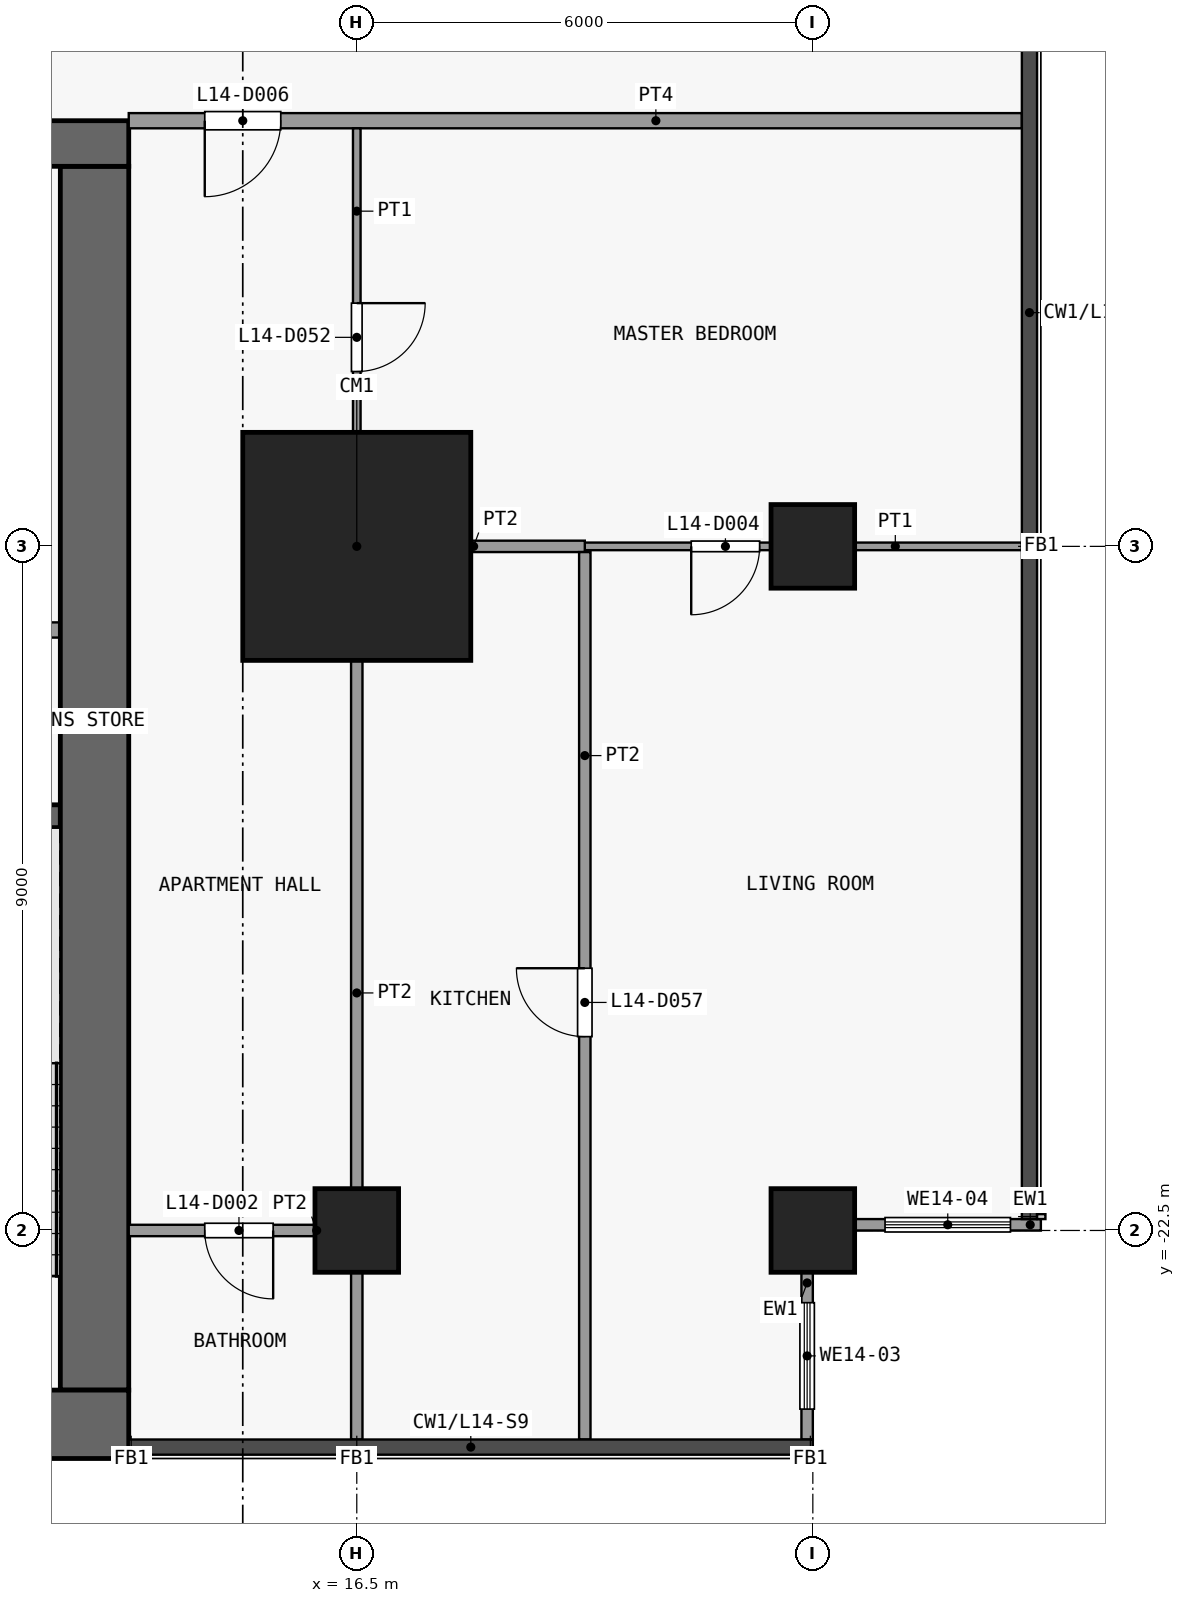
"""IFC4 building model, lengths in metres.
Left out: names, types, materials, properties, quantities, classifications, styles, units other than length and angle.
Written with IfcOpenShell. Run it as: python <this file> out.ifc"""

import sys

from ifc_helpers import new_model, si_unit, direction, frame, frame_2d, origin, origin_2d, place, context, subcontext, project, spatial, rectangle, extrude, element, fill, save


model = new_model("IFC4")
c1 = context("Model", 3, precision=1e-05, world=origin(), true_north=direction((0.0, 1.0)))
c2 = subcontext(c1, "Body", "Model", "MODEL_VIEW")
j1 = project(units=[si_unit("LENGTHUNIT", "METRE"), si_unit("PLANEANGLEUNIT", "RADIAN")], contexts=[c1])
p1 = place(None, origin())
s1 = spatial("IfcSite", under=j1, at=p1, CompositionType="ELEMENT")
p2 = place(p1, origin())
s2 = spatial("IfcBuilding", under=s1, at=p2, CompositionType="ELEMENT")
p3 = place(p2, frame((0.0, 0.0, 61.3)))
s3 = spatial("IfcBuildingStorey", under=s2, at=p3, CompositionType="ELEMENT", Elevation=61.3)
p4 = place(p3, frame((16.5, -22.5, 0.0), z_axis=(0.0, 0.0, 1.0), x_axis=(1.0, 0.0, 0.0)))
e1 = element("IfcColumn", 1, at=p4, inside=s3, PredefinedType="COLUMN", context=c2, shape_type="SweptSolid", body=[
    extrude(rectangle(XDim=1.1, YDim=1.1, at=origin_2d()), origin(), (0.0, 0.0, 1.0), 3.6),
])
p5 = place(p3, frame((16.5, -13.5, 0.0), z_axis=(0.0, 0.0, 1.0), x_axis=(1.0, 0.0, 0.0)))
e2 = element("IfcColumn", 2, at=p5, inside=s3, PredefinedType="COLUMN", context=c2, shape_type="SweptSolid", body=[
    extrude(rectangle(XDim=3.0, YDim=3.0, at=origin_2d()), origin(), (0.0, 0.0, 1.0), 3.6),
])
for number, where, z_axis, x_axis in (
    (3, (22.5, -22.5, 0.0), (0.0, 0.0, 1.0), (1.0, 0.0, 0.0)),
    (4, (22.5, -13.5, 0.0), (0.0, 0.0, 1.0), (1.0, 0.0, 0.0)),
):
    element("IfcColumn", number, at=place(p3, frame(where, z_axis=z_axis, x_axis=x_axis)), inside=s3, PredefinedType="COLUMN", context=c2, shape_type="SweptSolid", body=[
        extrude(rectangle(XDim=1.1, YDim=1.1, at=origin_2d()), origin(), (0.0, 0.0, 1.0), 3.6),
    ])
p6 = place(p3, frame((-13.5, -25.05, 0.0), z_axis=(0.0, 0.0, 1.0), x_axis=(1.0, 0.0, 0.0)))
e5 = element("IfcWall", 5, at=p6, inside=s3, PredefinedType="SHEAR", context=c2, shape_type="SweptSolid", body=[
    extrude(rectangle(XDim=27.0, YDim=0.9, at=frame_2d((13.5, 0.0))), origin(), (0.0, 0.0, 1.0), 3.3),
])
p7 = place(p3, frame((-13.5, -8.2, 0.0), z_axis=(0.0, 0.0, 1.0), x_axis=(1.0, 0.0, 0.0)))
e6 = element("IfcWall", 6, at=p7, inside=s3, PredefinedType="SHEAR", context=c2, shape_type="SweptSolid", body=[
    extrude(rectangle(XDim=27.0, YDim=0.6, at=frame_2d((13.5, 0.0))), origin(), (0.0, 0.0, 1.0), 3.3),
])
p8 = place(p7, frame((7.8, 0.0, 0.0)))
e7 = element("IfcOpeningElement", 7, at=p8, cuts=e6, PredefinedType="OPENING", context=c2, shape_type="SweptSolid", body=[
    extrude(rectangle(XDim=1.8, YDim=2.1, at=frame_2d((0.9, 1.05))), frame((0.0, 0.31, 0.0), z_axis=(0.0, -1.0, 0.0), x_axis=(1.0, 0.0, 0.0)), (0.0, 0.0, 1.0), 0.62),
])
p9 = place(p7, frame((17.4, 0.0, 0.0)))
e8 = element("IfcOpeningElement", 8, at=p9, cuts=e6, PredefinedType="OPENING", context=c2, shape_type="SweptSolid", body=[
    extrude(rectangle(XDim=1.8, YDim=2.1, at=frame_2d((0.9, 1.05))), frame((0.0, 0.31, 0.0), z_axis=(0.0, -1.0, 0.0), x_axis=(1.0, 0.0, 0.0)), (0.0, 0.0, 1.0), 0.62),
])
p10 = place(p7, frame((1.725, 0.0, 0.0)))
e9 = element("IfcOpeningElement", 9, at=p10, cuts=e6, PredefinedType="OPENING", context=c2, shape_type="SweptSolid", body=[
    extrude(rectangle(XDim=1.2, YDim=2.1, at=frame_2d((0.6, 1.05))), frame((0.0, 0.31, 0.0), z_axis=(0.0, -1.0, 0.0), x_axis=(1.0, 0.0, 0.0)), (0.0, 0.0, 1.0), 0.62),
])
p11 = place(p7, frame((23.375, 0.0, 0.0)))
e10 = element("IfcOpeningElement", 10, at=p11, cuts=e6, PredefinedType="OPENING", context=c2, shape_type="SweptSolid", body=[
    extrude(rectangle(XDim=0.9, YDim=2.1, at=frame_2d((0.45, 1.05))), frame((0.0, 0.31, 0.0), z_axis=(0.0, -1.0, 0.0), x_axis=(1.0, 0.0, 0.0)), (0.0, 0.0, 1.0), 0.62),
])
p12 = place(p3, frame((13.05, -24.6, 0.0), z_axis=(0.0, 0.0, 1.0), x_axis=(0.0, 1.0, 0.0)))
e11 = element("IfcWall", 11, at=p12, inside=s3, PredefinedType="SHEAR", context=c2, shape_type="SweptSolid", body=[
    extrude(rectangle(XDim=16.1, YDim=0.9, at=frame_2d((8.05, 0.0))), origin(), (0.0, 0.0, 1.0), 3.3),
])
p13 = place(p3, frame((9.5, -17.05, 0.0), z_axis=(0.0, 0.0, 1.0), x_axis=(1.0, 0.0, 0.0)))
e12 = element("IfcWall", 12, at=p13, inside=s3, PredefinedType="SHEAR", context=c2, shape_type="SweptSolid", body=[
    extrude(rectangle(XDim=3.1, YDim=0.3, at=frame_2d((1.55, 0.0))), origin(), (0.0, 0.0, 1.0), 3.3),
])
p14 = place(p3, frame((11.15, -14.6, 0.0), z_axis=(0.0, 0.0, 1.0), x_axis=(1.0, 0.0, 0.0)))
e13 = element("IfcWall", 13, at=p14, inside=s3, PredefinedType="PARTITIONING", context=c2, shape_type="SweptSolid", body=[
    extrude(rectangle(XDim=1.45, YDim=0.2, at=frame_2d((0.725, 0.0))), origin(), (0.0, 0.0, 1.0), 3.3),
])
p15 = place(p3, frame((22.425, -23.05, 0.0), z_axis=(0.0, 0.0, 1.0), x_axis=(0.0, -1.0, 0.0)))
e14 = element("IfcWall", 14, at=p15, inside=s3, PredefinedType="SOLIDWALL", context=c2, shape_type="SweptSolid", body=[
    extrude(rectangle(XDim=2.2, YDim=0.15, at=frame_2d((1.1, 0.0))), origin(), (0.0, 0.0, 1.0), 3.3),
])
p16 = place(p15, frame((0.4, 0.0, 0.9)))
e15 = element("IfcOpeningElement", 15, at=p16, cuts=e14, PredefinedType="OPENING", context=c2, shape_type="SweptSolid", body=[
    extrude(rectangle(XDim=1.4, YDim=2.4, at=frame_2d((0.7, 1.2))), frame((0.0, 0.085, 0.0), z_axis=(0.0, -1.0, 0.0), x_axis=(1.0, 0.0, 0.0)), (0.0, 0.0, 1.0), 0.17),
])
p17 = place(p3, frame((25.5, -22.425, 0.0), z_axis=(0.0, 0.0, 1.0), x_axis=(-1.0, 0.0, 0.0)))
e16 = element("IfcWall", 16, at=p17, inside=s3, PredefinedType="SOLIDWALL", context=c2, shape_type="SweptSolid", body=[
    extrude(rectangle(XDim=2.45, YDim=0.15, at=frame_2d((1.225, 0.0))), origin(), (0.0, 0.0, 1.0), 3.3),
])
p18 = place(p17, frame((0.4, 0.0, 0.9)))
e17 = element("IfcOpeningElement", 17, at=p18, cuts=e16, PredefinedType="OPENING", context=c2, shape_type="SweptSolid", body=[
    extrude(rectangle(XDim=1.65, YDim=2.4, at=frame_2d((0.825, 1.2))), frame((0.0, 0.085, 0.0), z_axis=(0.0, -1.0, 0.0), x_axis=(1.0, 0.0, 0.0)), (0.0, 0.0, 1.0), 0.17),
])
p19 = place(p3, frame((13.5, -22.5, 0.0), z_axis=(0.0, 0.0, 1.0), x_axis=(1.0, 0.0, 0.0)))
e18 = element("IfcWall", 18, at=p19, inside=s3, PredefinedType="PARTITIONING", context=c2, shape_type="SweptSolid", body=[
    extrude(rectangle(XDim=2.925, YDim=0.15, at=frame_2d((1.462, 0.0))), origin(), (0.0, 0.0, 1.0), 3.3),
])
p20 = place(p19, frame((1.0, 0.0, 0.0)))
e19 = element("IfcOpeningElement", 19, at=p20, cuts=e18, PredefinedType="OPENING", context=c2, shape_type="SweptSolid", body=[
    extrude(rectangle(XDim=0.9, YDim=2.1, at=frame_2d((0.45, 1.05))), frame((0.0, 0.085, 0.0), z_axis=(0.0, -1.0, 0.0), x_axis=(1.0, 0.0, 0.0)), (0.0, 0.0, 1.0), 0.17),
])
p21 = place(p3, frame((19.5, -13.5, 0.0), z_axis=(0.0, 0.0, 1.0), x_axis=(1.0, 0.0, 0.0)))
e20 = element("IfcWall", 20, at=p21, inside=s3, PredefinedType="PARTITIONING", context=c2, shape_type="SweptSolid", body=[
    extrude(rectangle(XDim=5.75, YDim=0.1, at=frame_2d((2.875, 0.0))), origin(), (0.0, 0.0, 1.0), 3.3),
])
p22 = place(p21, frame((1.4, 0.0, 0.0)))
e21 = element("IfcOpeningElement", 21, at=p22, cuts=e20, PredefinedType="OPENING", context=c2, shape_type="SweptSolid", body=[
    extrude(rectangle(XDim=0.9, YDim=2.1, at=frame_2d((0.45, 1.05))), frame((0.0, 0.06, 0.0), z_axis=(0.0, -1.0, 0.0), x_axis=(1.0, 0.0, 0.0)), (0.0, 0.0, 1.0), 0.12),
])
p23 = place(p3, frame((16.575, -13.5, 0.0), z_axis=(0.0, 0.0, 1.0), x_axis=(1.0, 0.0, 0.0)))
e22 = element("IfcWall", 22, at=p23, inside=s3, PredefinedType="PARTITIONING", context=c2, shape_type="SweptSolid", body=[
    extrude(rectangle(XDim=2.925, YDim=0.15, at=frame_2d((1.462, 0.0))), origin(), (0.0, 0.0, 1.0), 3.3),
])
p24 = place(p3, frame((13.5, -7.9, 0.0), z_axis=(0.0, 0.0, 1.0), x_axis=(1.0, 0.0, 0.0)))
e23 = element("IfcWall", 23, at=p24, inside=s3, PredefinedType="PARTITIONING", context=c2, shape_type="SweptSolid", body=[
    extrude(rectangle(XDim=11.75, YDim=0.2, at=frame_2d((5.875, 0.0))), origin(), (0.0, 0.0, 1.0), 3.3),
])
p25 = place(p24, frame((1.0, 0.0, 0.0)))
e24 = element("IfcOpeningElement", 24, at=p25, cuts=e23, PredefinedType="OPENING", context=c2, shape_type="SweptSolid", body=[
    extrude(rectangle(XDim=1.0, YDim=2.1, at=frame_2d((0.5, 1.05))), frame((0.0, 0.11, 0.0), z_axis=(0.0, -1.0, 0.0), x_axis=(1.0, 0.0, 0.0)), (0.0, 0.0, 1.0), 0.22),
])
p26 = place(p3, frame((16.5, -13.5, 0.0), z_axis=(0.0, 0.0, 1.0), x_axis=(0.0, 1.0, 0.0)))
e25 = element("IfcWall", 25, at=p26, inside=s3, PredefinedType="PARTITIONING", context=c2, shape_type="SweptSolid", body=[
    extrude(rectangle(XDim=5.5, YDim=0.1, at=frame_2d((2.75, 0.0))), origin(), (0.0, 0.0, 1.0), 3.3),
])
p27 = place(p26, frame((2.3, 0.0, 0.0)))
e26 = element("IfcOpeningElement", 26, at=p27, cuts=e25, PredefinedType="OPENING", context=c2, shape_type="SweptSolid", body=[
    extrude(rectangle(XDim=0.9, YDim=2.1, at=frame_2d((0.45, 1.05))), frame((0.0, 0.06, 0.0), z_axis=(0.0, -1.0, 0.0), x_axis=(1.0, 0.0, 0.0)), (0.0, 0.0, 1.0), 0.12),
])
p28 = place(p3, frame((16.5, -25.25, 0.0), z_axis=(0.0, 0.0, 1.0), x_axis=(0.0, 1.0, 0.0)))
e27 = element("IfcWall", 27, at=p28, inside=s3, PredefinedType="PARTITIONING", context=c2, shape_type="SweptSolid", body=[
    extrude(rectangle(XDim=11.75, YDim=0.15, at=frame_2d((5.875, 0.0))), origin(), (0.0, 0.0, 1.0), 3.3),
])
p29 = place(p3, frame((19.5, -25.25, 0.0), z_axis=(0.0, 0.0, 1.0), x_axis=(0.0, 1.0, 0.0)))
e28 = element("IfcWall", 28, at=p29, inside=s3, PredefinedType="PARTITIONING", context=c2, shape_type="SweptSolid", body=[
    extrude(rectangle(XDim=11.675, YDim=0.15, at=frame_2d((5.837, 0.0))), origin(), (0.0, 0.0, 1.0), 3.3),
])
p30 = place(p29, frame((5.3, 0.0, 0.0)))
e29 = element("IfcOpeningElement", 29, at=p30, cuts=e28, PredefinedType="OPENING", context=c2, shape_type="SweptSolid", body=[
    extrude(rectangle(XDim=0.9, YDim=2.1, at=frame_2d((0.45, 1.05))), frame((0.0, 0.085, 0.0), z_axis=(0.0, -1.0, 0.0), x_axis=(1.0, 0.0, 0.0)), (0.0, 0.0, 1.0), 0.17),
])
p31 = place(p16, origin())
e30 = element("IfcWindow", 30, at=p31, inside=s3, PartitioningType="SINGLE_PANEL", PredefinedType="WINDOW", context=c2, shape_type="SweptSolid", body=[
    extrude(rectangle(XDim=1.4, YDim=2.4, at=frame_2d((0.7, 1.2))), frame((0.0, 0.03, 0.0), z_axis=(0.0, -1.0, 0.0), x_axis=(1.0, 0.0, 0.0)), (0.0, 0.0, 1.0), 0.06),
])
fill(e15, e30)
p32 = place(p18, origin())
e31 = element("IfcWindow", 31, at=p32, inside=s3, PartitioningType="SINGLE_PANEL", PredefinedType="WINDOW", context=c2, shape_type="SweptSolid", body=[
    extrude(rectangle(XDim=1.65, YDim=2.4, at=frame_2d((0.825, 1.2))), frame((0.0, 0.03, 0.0), z_axis=(0.0, -1.0, 0.0), x_axis=(1.0, 0.0, 0.0)), (0.0, 0.0, 1.0), 0.06),
])
fill(e17, e31)
p33 = place(p20, origin())
e32 = element("IfcDoor", 32, at=p33, inside=s3, OperationType="SINGLE_SWING_RIGHT", PredefinedType="DOOR", context=c2, shape_type="SweptSolid", body=[
    extrude(rectangle(XDim=0.9, YDim=2.1, at=frame_2d((0.45, 1.05))), frame((0.0, 0.025, 0.0), z_axis=(0.0, -1.0, 0.0), x_axis=(1.0, 0.0, 0.0)), (0.0, 0.0, 1.0), 0.05),
])
fill(e19, e32)
p34 = place(p22, origin())
e33 = element("IfcDoor", 33, at=p34, inside=s3, OperationType="SINGLE_SWING_LEFT", PredefinedType="DOOR", context=c2, shape_type="SweptSolid", body=[
    extrude(rectangle(XDim=0.9, YDim=2.1, at=frame_2d((0.45, 1.05))), frame((0.0, 0.025, 0.0), z_axis=(0.0, -1.0, 0.0), x_axis=(1.0, 0.0, 0.0)), (0.0, 0.0, 1.0), 0.05),
])
fill(e21, e33)
p35 = place(p25, origin())
e34 = element("IfcDoor", 34, at=p35, inside=s3, OperationType="SINGLE_SWING_LEFT", PredefinedType="DOOR", context=c2, shape_type="SweptSolid", body=[
    extrude(rectangle(XDim=1.0, YDim=2.1, at=frame_2d((0.5, 1.05))), frame((0.0, 0.025, 0.0), z_axis=(0.0, -1.0, 0.0), x_axis=(1.0, 0.0, 0.0)), (0.0, 0.0, 1.0), 0.05),
])
fill(e24, e34)
p36 = place(p27, origin())
e35 = element("IfcDoor", 35, at=p36, inside=s3, OperationType="SINGLE_SWING_RIGHT", PredefinedType="DOOR", context=c2, shape_type="SweptSolid", body=[
    extrude(rectangle(XDim=0.9, YDim=2.1, at=frame_2d((0.45, 1.05))), frame((0.0, 0.025, 0.0), z_axis=(0.0, -1.0, 0.0), x_axis=(1.0, 0.0, 0.0)), (0.0, 0.0, 1.0), 0.05),
])
fill(e26, e35)
p37 = place(p30, origin())
e36 = element("IfcDoor", 36, at=p37, inside=s3, OperationType="SINGLE_SWING_LEFT", PredefinedType="DOOR", context=c2, shape_type="SweptSolid", body=[
    extrude(rectangle(XDim=0.9, YDim=2.1, at=frame_2d((0.45, 1.05))), frame((0.0, 0.025, 0.0), z_axis=(0.0, -1.0, 0.0), x_axis=(1.0, 0.0, 0.0)), (0.0, 0.0, 1.0), 0.05),
])
fill(e29, e36)
save(model, sys.argv[1])
